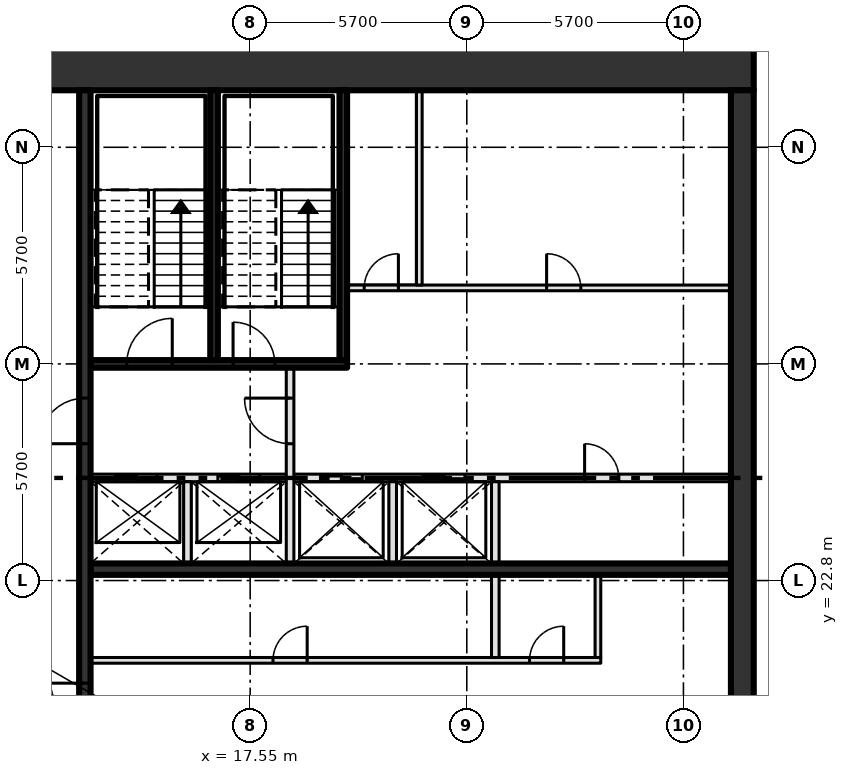
"""IFC4 building model, lengths in metres.
Left out: names, types, materials, properties, quantities, classifications, styles, units other than length and angle.
Written with IfcOpenShell. Run it as: python <this file> out.ifc"""

import sys

from ifc_helpers import new_model, si_unit, direction, frame, frame_2d, origin, place, context, subcontext, project, spatial, rectangle, extrude, element, fill, save


model = new_model("IFC4")
c1 = context("Model", 3, precision=1e-05, world=origin(), true_north=direction((0.0, 1.0)))
c2 = subcontext(c1, "Body", "Model", "MODEL_VIEW")
j1 = project(units=[si_unit("LENGTHUNIT", "METRE"), si_unit("PLANEANGLEUNIT", "RADIAN")], contexts=[c1])
p1 = place(None, origin())
s1 = spatial("IfcSite", under=j1, at=p1, CompositionType="ELEMENT")
p2 = place(p1, origin())
s2 = spatial("IfcBuilding", under=s1, at=p2, CompositionType="ELEMENT")
p3 = place(p2, frame((0.0, 0.0, 344.4)))
s3 = spatial("IfcBuildingStorey", under=s2, at=p3, CompositionType="ELEMENT", Elevation=344.4)
p4 = place(p3, frame((8.0, 36.3, -0.3), z_axis=(0.0, 0.0, 1.0), x_axis=(1.0, 0.0, 0.0)))
e1 = element("IfcWall", 1, at=p4, inside=s3, PredefinedType="SHEAR", context=c2, shape_type="SweptSolid", body=[
    extrude(rectangle(XDim=22.8, YDim=1.2, at=frame_2d((11.4, 0.0))), origin(), (0.0, 0.0, 1.0), 4.05),
])
p5 = place(p4, frame((2.3, 0.0, 0.3)))
e2 = element("IfcOpeningElement", 2, at=p5, cuts=e1, PredefinedType="OPENING", context=c2, shape_type="SweptSolid", body=[
    extrude(rectangle(XDim=1.8, YDim=2.1, at=frame_2d((0.9, 1.05))), frame((0.0, 0.61, 0.0), z_axis=(0.0, -1.0, 0.0), x_axis=(1.0, 0.0, 0.0)), (0.0, 0.0, 1.0), 1.22),
])
p6 = place(p3, frame((30.5, 14.7, -0.3), z_axis=(0.0, 0.0, 1.0), x_axis=(0.0, 1.0, 0.0)))
e3 = element("IfcWall", 3, at=p6, inside=s3, PredefinedType="SHEAR", context=c2, shape_type="SweptSolid", body=[
    extrude(rectangle(XDim=21.0, YDim=0.6, at=frame_2d((10.5, 0.0))), origin(), (0.0, 0.0, 1.0), 4.05),
])
p7 = place(p3, frame((13.35, 20.7, 0.0), z_axis=(0.0, 0.0, 1.0), x_axis=(1.0, 0.0, 0.0)))
e4 = element("IfcWall", 4, at=p7, inside=s3, PredefinedType="PARTITIONING", context=c2, shape_type="SweptSolid", body=[
    extrude(rectangle(XDim=13.425, YDim=0.15, at=frame_2d((6.712, 0.0))), origin(), (0.0, 0.0, 1.0), 3.75),
])
p8 = place(p7, frame((4.8, 0.0, 0.0)))
e5 = element("IfcOpeningElement", 5, at=p8, cuts=e4, PredefinedType="OPENING", context=c2, shape_type="SweptSolid", body=[
    extrude(rectangle(XDim=0.9, YDim=2.1, at=frame_2d((0.45, 1.05))), frame((0.0, 0.085, 0.0), z_axis=(0.0, -1.0, 0.0), x_axis=(1.0, 0.0, 0.0)), (0.0, 0.0, 1.0), 0.17),
])
p9 = place(p7, frame((11.55, 0.0, 0.0)))
e6 = element("IfcOpeningElement", 6, at=p9, cuts=e4, PredefinedType="OPENING", context=c2, shape_type="SweptSolid", body=[
    extrude(rectangle(XDim=0.9, YDim=2.1, at=frame_2d((0.45, 1.05))), frame((0.0, 0.085, 0.0), z_axis=(0.0, -1.0, 0.0), x_axis=(1.0, 0.0, 0.0)), (0.0, 0.0, 1.0), 0.17),
])
p10 = place(p3, frame((13.35, 23.1, 0.0), z_axis=(0.0, 0.0, 1.0), x_axis=(1.0, 0.0, 0.0)))
e7 = element("IfcWall", 7, at=p10, inside=s3, PredefinedType="SHEAR", context=c2, shape_type="SweptSolid", body=[
    extrude(rectangle(XDim=16.85, YDim=0.3, at=frame_2d((8.425, 0.0))), origin(), (0.0, 0.0, 1.0), 3.75),
])
p11 = place(p3, frame((13.35, 25.5, 0.0), z_axis=(0.0, 0.0, 1.0), x_axis=(1.0, 0.0, 0.0)))
e8 = element("IfcWall", 8, at=p11, inside=s3, PredefinedType="SOLIDWALL", context=c2, shape_type="SweptSolid", body=[
    extrude(rectangle(XDim=16.85, YDim=0.2, at=frame_2d((8.425, 0.0))), origin(), (0.0, 0.0, 1.0), 3.75),
])
p12 = place(p11, frame((0.65, 0.0, 0.0)))
e9 = element("IfcOpeningElement", 9, at=p12, cuts=e8, PredefinedType="OPENING", context=c2, shape_type="SweptSolid", body=[
    extrude(rectangle(XDim=1.1, YDim=2.1, at=frame_2d((0.55, 1.05))), frame((0.0, 0.11, 0.0), z_axis=(0.0, -1.0, 0.0), x_axis=(1.0, 0.0, 0.0)), (0.0, 0.0, 1.0), 0.22),
])
p13 = place(p11, frame((3.35, 0.0, 0.0)))
e10 = element("IfcOpeningElement", 10, at=p13, cuts=e8, PredefinedType="OPENING", context=c2, shape_type="SweptSolid", body=[
    extrude(rectangle(XDim=1.1, YDim=2.1, at=frame_2d((0.55, 1.05))), frame((0.0, 0.11, 0.0), z_axis=(0.0, -1.0, 0.0), x_axis=(1.0, 0.0, 0.0)), (0.0, 0.0, 1.0), 0.22),
])
p14 = place(p11, frame((6.05, 0.0, 0.0)))
e11 = element("IfcOpeningElement", 11, at=p14, cuts=e8, PredefinedType="OPENING", context=c2, shape_type="SweptSolid", body=[
    extrude(rectangle(XDim=1.1, YDim=2.1, at=frame_2d((0.55, 1.05))), frame((0.0, 0.11, 0.0), z_axis=(0.0, -1.0, 0.0), x_axis=(1.0, 0.0, 0.0)), (0.0, 0.0, 1.0), 0.22),
])
p15 = place(p11, frame((8.75, 0.0, 0.0)))
e12 = element("IfcOpeningElement", 12, at=p15, cuts=e8, PredefinedType="OPENING", context=c2, shape_type="SweptSolid", body=[
    extrude(rectangle(XDim=1.1, YDim=2.1, at=frame_2d((0.55, 1.05))), frame((0.0, 0.11, 0.0), z_axis=(0.0, -1.0, 0.0), x_axis=(1.0, 0.0, 0.0)), (0.0, 0.0, 1.0), 0.22),
])
p16 = place(p11, frame((13.0, 0.0, 0.0)))
e13 = element("IfcOpeningElement", 13, at=p16, cuts=e8, PredefinedType="OPENING", context=c2, shape_type="SweptSolid", body=[
    extrude(rectangle(XDim=0.9, YDim=2.1, at=frame_2d((0.45, 1.05))), frame((0.0, 0.11, 0.0), z_axis=(0.0, -1.0, 0.0), x_axis=(1.0, 0.0, 0.0)), (0.0, 0.0, 1.0), 0.22),
])
p17 = place(p3, frame((13.35, 28.5, 0.0), z_axis=(0.0, 0.0, 1.0), x_axis=(1.0, 0.0, 0.0)))
e14 = element("IfcWall", 14, at=p17, inside=s3, PredefinedType="SOLIDWALL", context=c2, shape_type="SweptSolid", body=[
    extrude(rectangle(XDim=6.75, YDim=0.2, at=frame_2d((3.375, 0.0))), origin(), (0.0, 0.0, 1.0), 3.75),
])
p18 = place(p17, frame((0.95, 0.0, 0.0)))
e15 = element("IfcOpeningElement", 15, at=p18, cuts=e14, PredefinedType="OPENING", context=c2, shape_type="SweptSolid", body=[
    extrude(rectangle(XDim=1.2, YDim=2.1, at=frame_2d((0.6, 1.05))), frame((0.0, 0.11, 0.0), z_axis=(0.0, -1.0, 0.0), x_axis=(1.0, 0.0, 0.0)), (0.0, 0.0, 1.0), 0.22),
])
p19 = place(p17, frame((3.75, 0.0, 0.0)))
e16 = element("IfcOpeningElement", 16, at=p19, cuts=e14, PredefinedType="OPENING", context=c2, shape_type="SweptSolid", body=[
    extrude(rectangle(XDim=1.1, YDim=2.1, at=frame_2d((0.55, 1.05))), frame((0.0, 0.11, 0.0), z_axis=(0.0, -1.0, 0.0), x_axis=(1.0, 0.0, 0.0)), (0.0, 0.0, 1.0), 0.22),
])
p20 = place(p3, frame((20.1, 30.5, 0.0), z_axis=(0.0, 0.0, 1.0), x_axis=(1.0, 0.0, 0.0)))
e17 = element("IfcWall", 17, at=p20, inside=s3, PredefinedType="PARTITIONING", context=c2, shape_type="SweptSolid", body=[
    extrude(rectangle(XDim=10.1, YDim=0.15, at=frame_2d((5.05, 0.0))), origin(), (0.0, 0.0, 1.0), 3.75),
])
p21 = place(p20, frame((0.45, 0.0, 0.0)))
e18 = element("IfcOpeningElement", 18, at=p21, cuts=e17, PredefinedType="OPENING", context=c2, shape_type="SweptSolid", body=[
    extrude(rectangle(XDim=0.9, YDim=2.1, at=frame_2d((0.45, 1.05))), frame((0.0, 0.085, 0.0), z_axis=(0.0, -1.0, 0.0), x_axis=(1.0, 0.0, 0.0)), (0.0, 0.0, 1.0), 0.17),
])
p22 = place(p20, frame((5.25, 0.0, 0.0)))
e19 = element("IfcOpeningElement", 19, at=p22, cuts=e17, PredefinedType="OPENING", context=c2, shape_type="SweptSolid", body=[
    extrude(rectangle(XDim=0.9, YDim=2.1, at=frame_2d((0.45, 1.05))), frame((0.0, 0.085, 0.0), z_axis=(0.0, -1.0, 0.0), x_axis=(1.0, 0.0, 0.0)), (0.0, 0.0, 1.0), 0.17),
])
p23 = place(p3, frame((13.2, 14.7, 0.0), z_axis=(0.0, 0.0, 1.0), x_axis=(0.0, 1.0, 0.0)))
e20 = element("IfcWall", 20, at=p23, inside=s3, PredefinedType="SHEAR", context=c2, shape_type="SweptSolid", body=[
    extrude(rectangle(XDim=21.0, YDim=0.3, at=frame_2d((10.5, 0.0))), origin(), (0.0, 0.0, 1.0), 3.75),
])
p24 = place(p23, frame((3.6, 0.0, 0.0)))
e21 = element("IfcOpeningElement", 21, at=p24, cuts=e20, PredefinedType="OPENING", context=c2, shape_type="SweptSolid", body=[
    extrude(rectangle(XDim=1.8, YDim=2.1, at=frame_2d((0.9, 1.05))), frame((0.0, 0.16, 0.0), z_axis=(0.0, -1.0, 0.0), x_axis=(1.0, 0.0, 0.0)), (0.0, 0.0, 1.0), 0.32),
])
p25 = place(p23, frame((11.7, 0.0, 0.0)))
e22 = element("IfcOpeningElement", 22, at=p25, cuts=e20, PredefinedType="OPENING", context=c2, shape_type="SweptSolid", body=[
    extrude(rectangle(XDim=1.2, YDim=2.1, at=frame_2d((0.6, 1.05))), frame((0.0, 0.16, 0.0), z_axis=(0.0, -1.0, 0.0), x_axis=(1.0, 0.0, 0.0)), (0.0, 0.0, 1.0), 0.32),
])
p26 = place(p3, frame((15.9, 23.25, 0.0), z_axis=(0.0, 0.0, 1.0), x_axis=(0.0, 1.0, 0.0)))
e23 = element("IfcWall", 23, at=p26, inside=s3, PredefinedType="SOLIDWALL", context=c2, shape_type="SweptSolid", body=[
    extrude(rectangle(XDim=2.15, YDim=0.2, at=frame_2d((1.075, 0.0))), origin(), (0.0, 0.0, 1.0), 3.75),
])
p27 = place(p3, frame((16.6, 28.6, 0.0), z_axis=(0.0, 0.0, 1.0), x_axis=(0.0, 1.0, 0.0)))
e24 = element("IfcWall", 24, at=p27, inside=s3, PredefinedType="SOLIDWALL", context=c2, shape_type="SweptSolid", body=[
    extrude(rectangle(XDim=7.1, YDim=0.2, at=frame_2d((3.55, 0.0))), origin(), (0.0, 0.0, 1.0), 3.75),
])
p28 = place(p3, frame((18.6, 23.25, 0.0), z_axis=(0.0, 0.0, 1.0), x_axis=(0.0, 1.0, 0.0)))
e25 = element("IfcWall", 25, at=p28, inside=s3, PredefinedType="SOLIDWALL", context=c2, shape_type="SweptSolid", body=[
    extrude(rectangle(XDim=5.15, YDim=0.2, at=frame_2d((2.575, 0.0))), origin(), (0.0, 0.0, 1.0), 3.75),
])
p29 = place(p28, frame((3.15, 0.0, 0.0)))
e26 = element("IfcOpeningElement", 26, at=p29, cuts=e25, PredefinedType="OPENING", context=c2, shape_type="SweptSolid", body=[
    extrude(rectangle(XDim=1.2, YDim=2.1, at=frame_2d((0.6, 1.05))), frame((0.0, 0.11, 0.0), z_axis=(0.0, -1.0, 0.0), x_axis=(1.0, 0.0, 0.0)), (0.0, 0.0, 1.0), 0.22),
])
p30 = place(p3, frame((20.0, 28.6, 0.0), z_axis=(0.0, 0.0, 1.0), x_axis=(0.0, 1.0, 0.0)))
e27 = element("IfcWall", 27, at=p30, inside=s3, PredefinedType="SOLIDWALL", context=c2, shape_type="SweptSolid", body=[
    extrude(rectangle(XDim=7.1, YDim=0.2, at=frame_2d((3.55, 0.0))), origin(), (0.0, 0.0, 1.0), 3.75),
])
p31 = place(p3, frame((21.3, 23.25, 0.0), z_axis=(0.0, 0.0, 1.0), x_axis=(0.0, 1.0, 0.0)))
e28 = element("IfcWall", 28, at=p31, inside=s3, PredefinedType="SOLIDWALL", context=c2, shape_type="SweptSolid", body=[
    extrude(rectangle(XDim=2.15, YDim=0.2, at=frame_2d((1.075, 0.0))), origin(), (0.0, 0.0, 1.0), 3.75),
])
p32 = place(p3, frame((22.0, 30.575, 0.0), z_axis=(0.0, 0.0, 1.0), x_axis=(0.0, 1.0, 0.0)))
e29 = element("IfcWall", 29, at=p32, inside=s3, PredefinedType="PARTITIONING", context=c2, shape_type="SweptSolid", body=[
    extrude(rectangle(XDim=5.125, YDim=0.15, at=frame_2d((2.562, 0.0))), origin(), (0.0, 0.0, 1.0), 3.75),
])
p33 = place(p3, frame((24.0, 20.775, 0.0), z_axis=(0.0, 0.0, 1.0), x_axis=(0.0, 1.0, 0.0)))
e30 = element("IfcWall", 30, at=p33, inside=s3, PredefinedType="SOLIDWALL", context=c2, shape_type="SweptSolid", body=[
    extrude(rectangle(XDim=4.625, YDim=0.2, at=frame_2d((2.312, 0.0))), origin(), (0.0, 0.0, 1.0), 3.75),
])
p34 = place(p3, frame((26.7, 20.775, 0.0), z_axis=(0.0, 0.0, 1.0), x_axis=(0.0, 1.0, 0.0)))
e31 = element("IfcWall", 31, at=p34, inside=s3, PredefinedType="PARTITIONING", context=c2, shape_type="SweptSolid", body=[
    extrude(rectangle(XDim=2.175, YDim=0.15, at=frame_2d((1.087, 0.0))), origin(), (0.0, 0.0, 1.0), 3.75),
])
p35 = place(p12, origin())
e32 = element("IfcDoor", 32, at=p35, inside=s3, OperationType="SLIDING_TO_LEFT", PredefinedType="DOOR", context=c2, shape_type="SweptSolid", body=[
    extrude(rectangle(XDim=1.1, YDim=2.1, at=frame_2d((0.55, 1.05))), frame((0.0, 0.025, 0.0), z_axis=(0.0, -1.0, 0.0), x_axis=(1.0, 0.0, 0.0)), (0.0, 0.0, 1.0), 0.05),
])
fill(e9, e32)
p36 = place(p13, origin())
e33 = element("IfcDoor", 33, at=p36, inside=s3, OperationType="SLIDING_TO_LEFT", PredefinedType="DOOR", context=c2, shape_type="SweptSolid", body=[
    extrude(rectangle(XDim=1.1, YDim=2.1, at=frame_2d((0.55, 1.05))), frame((0.0, 0.025, 0.0), z_axis=(0.0, -1.0, 0.0), x_axis=(1.0, 0.0, 0.0)), (0.0, 0.0, 1.0), 0.05),
])
fill(e10, e33)
p37 = place(p14, origin())
e34 = element("IfcDoor", 34, at=p37, inside=s3, OperationType="SLIDING_TO_LEFT", PredefinedType="DOOR", context=c2, shape_type="SweptSolid", body=[
    extrude(rectangle(XDim=1.1, YDim=2.1, at=frame_2d((0.55, 1.05))), frame((0.0, 0.025, 0.0), z_axis=(0.0, -1.0, 0.0), x_axis=(1.0, 0.0, 0.0)), (0.0, 0.0, 1.0), 0.05),
])
fill(e11, e34)
p38 = place(p15, origin())
e35 = element("IfcDoor", 35, at=p38, inside=s3, OperationType="SLIDING_TO_LEFT", PredefinedType="DOOR", context=c2, shape_type="SweptSolid", body=[
    extrude(rectangle(XDim=1.1, YDim=2.1, at=frame_2d((0.55, 1.05))), frame((0.0, 0.025, 0.0), z_axis=(0.0, -1.0, 0.0), x_axis=(1.0, 0.0, 0.0)), (0.0, 0.0, 1.0), 0.05),
])
fill(e12, e35)
p39 = place(p8, origin())
e36 = element("IfcDoor", 36, at=p39, inside=s3, OperationType="SINGLE_SWING_RIGHT", PredefinedType="DOOR", context=c2, shape_type="SweptSolid", body=[
    extrude(rectangle(XDim=0.9, YDim=2.1, at=frame_2d((0.45, 1.05))), frame((0.0, 0.025, 0.0), z_axis=(0.0, -1.0, 0.0), x_axis=(1.0, 0.0, 0.0)), (0.0, 0.0, 1.0), 0.05),
])
fill(e5, e36)
p40 = place(p9, origin())
e37 = element("IfcDoor", 37, at=p40, inside=s3, OperationType="SINGLE_SWING_RIGHT", PredefinedType="DOOR", context=c2, shape_type="SweptSolid", body=[
    extrude(rectangle(XDim=0.9, YDim=2.1, at=frame_2d((0.45, 1.05))), frame((0.0, 0.025, 0.0), z_axis=(0.0, -1.0, 0.0), x_axis=(1.0, 0.0, 0.0)), (0.0, 0.0, 1.0), 0.05),
])
fill(e6, e37)
p41 = place(p16, origin())
e38 = element("IfcDoor", 38, at=p41, inside=s3, OperationType="SINGLE_SWING_LEFT", PredefinedType="DOOR", context=c2, shape_type="SweptSolid", body=[
    extrude(rectangle(XDim=0.9, YDim=2.1, at=frame_2d((0.45, 1.05))), frame((0.0, 0.025, 0.0), z_axis=(0.0, -1.0, 0.0), x_axis=(1.0, 0.0, 0.0)), (0.0, 0.0, 1.0), 0.05),
])
fill(e13, e38)
p42 = place(p21, origin())
e39 = element("IfcDoor", 39, at=p42, inside=s3, OperationType="SINGLE_SWING_RIGHT", PredefinedType="DOOR", context=c2, shape_type="SweptSolid", body=[
    extrude(rectangle(XDim=0.9, YDim=2.1, at=frame_2d((0.45, 1.05))), frame((0.0, 0.025, 0.0), z_axis=(0.0, -1.0, 0.0), x_axis=(1.0, 0.0, 0.0)), (0.0, 0.0, 1.0), 0.05),
])
fill(e18, e39)
p43 = place(p22, origin())
e40 = element("IfcDoor", 40, at=p43, inside=s3, OperationType="SINGLE_SWING_LEFT", PredefinedType="DOOR", context=c2, shape_type="SweptSolid", body=[
    extrude(rectangle(XDim=0.9, YDim=2.1, at=frame_2d((0.45, 1.05))), frame((0.0, 0.025, 0.0), z_axis=(0.0, -1.0, 0.0), x_axis=(1.0, 0.0, 0.0)), (0.0, 0.0, 1.0), 0.05),
])
fill(e19, e40)
p44 = place(p18, origin())
e41 = element("IfcDoor", 41, at=p44, inside=s3, OperationType="SINGLE_SWING_RIGHT", PredefinedType="DOOR", context=c2, shape_type="SweptSolid", body=[
    extrude(rectangle(XDim=1.2, YDim=2.1, at=frame_2d((0.6, 1.05))), frame((0.0, 0.025, 0.0), z_axis=(0.0, -1.0, 0.0), x_axis=(1.0, 0.0, 0.0)), (0.0, 0.0, 1.0), 0.05),
])
fill(e15, e41)
p45 = place(p19, origin())
e42 = element("IfcDoor", 42, at=p45, inside=s3, OperationType="SINGLE_SWING_LEFT", PredefinedType="DOOR", context=c2, shape_type="SweptSolid", body=[
    extrude(rectangle(XDim=1.1, YDim=2.1, at=frame_2d((0.55, 1.05))), frame((0.0, 0.025, 0.0), z_axis=(0.0, -1.0, 0.0), x_axis=(1.0, 0.0, 0.0)), (0.0, 0.0, 1.0), 0.05),
])
fill(e16, e42)
p46 = place(p24, origin())
e43 = element("IfcDoor", 43, at=p46, inside=s3, OperationType="DOUBLE_DOOR_SINGLE_SWING", PredefinedType="DOOR", context=c2, shape_type="SweptSolid", body=[
    extrude(rectangle(XDim=1.8, YDim=2.1, at=frame_2d((0.9, 1.05))), frame((0.0, 0.025, 0.0), z_axis=(0.0, -1.0, 0.0), x_axis=(1.0, 0.0, 0.0)), (0.0, 0.0, 1.0), 0.05),
])
fill(e21, e43)
p47 = place(p25, origin())
e44 = element("IfcDoor", 44, at=p47, inside=s3, OperationType="SINGLE_SWING_LEFT", PredefinedType="DOOR", context=c2, shape_type="SweptSolid", body=[
    extrude(rectangle(XDim=1.2, YDim=2.1, at=frame_2d((0.6, 1.05))), frame((0.0, 0.025, 0.0), z_axis=(0.0, -1.0, 0.0), x_axis=(1.0, 0.0, 0.0)), (0.0, 0.0, 1.0), 0.05),
])
fill(e22, e44)
p48 = place(p29, origin())
e45 = element("IfcDoor", 45, at=p48, inside=s3, OperationType="SINGLE_SWING_RIGHT", PredefinedType="DOOR", context=c2, shape_type="SweptSolid", body=[
    extrude(rectangle(XDim=1.2, YDim=2.1, at=frame_2d((0.6, 1.05))), frame((0.0, 0.025, 0.0), z_axis=(0.0, -1.0, 0.0), x_axis=(1.0, 0.0, 0.0)), (0.0, 0.0, 1.0), 0.05),
])
fill(e26, e45)
save(model, sys.argv[1])
